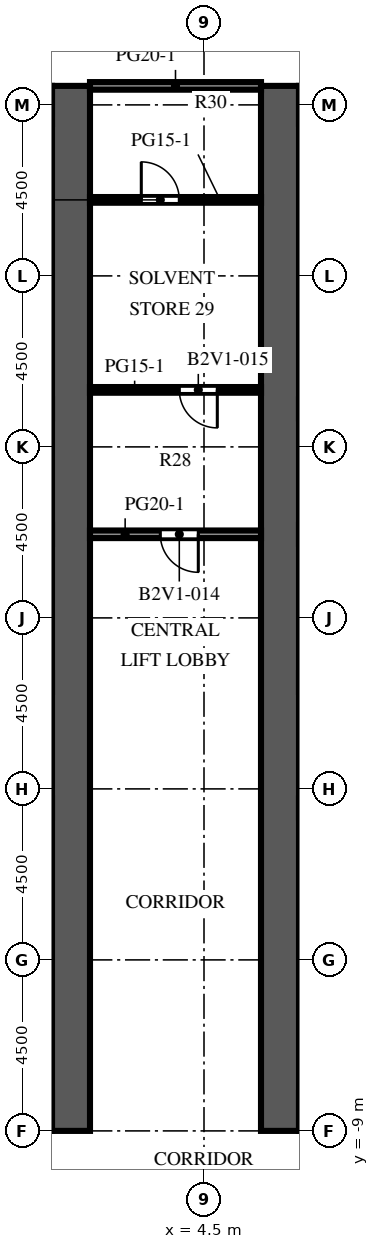
"""IFC4 building model, lengths in metres.
Left out: names, types, materials, properties, quantities, classifications, styles, units other than length and angle.
Written with IfcOpenShell. Run it as: python <this file> out.ifc"""

import sys

from ifc_helpers import new_model, si_unit, direction, frame, frame_2d, origin, place, context, subcontext, project, spatial, rectangle, extrude, element, fill, save


model = new_model("IFC4")
c1 = context("Model", 3, precision=1e-05, world=origin(), true_north=direction((0.0, 1.0)))
c2 = subcontext(c1, "Body", "Model", "MODEL_VIEW")
j1 = project(units=[si_unit("LENGTHUNIT", "METRE"), si_unit("PLANEANGLEUNIT", "RADIAN")], contexts=[c1])
p1 = place(None, origin())
s1 = spatial("IfcSite", under=j1, at=p1, CompositionType="ELEMENT")
p2 = place(p1, origin())
s2 = spatial("IfcBuilding", under=s1, at=p2, CompositionType="ELEMENT")
p3 = place(p2, frame((0.0, 0.0, 54.2)))
s3 = spatial("IfcBuildingStorey", under=s2, at=p3, CompositionType="ELEMENT", Elevation=54.2)
p4 = place(p3, frame((1.0, -9.0, 0.0), z_axis=(0.0, 0.0, 1.0), x_axis=(0.0, 1.0, 0.0)))
e1 = element("IfcWall", 1, at=p4, inside=s3, PredefinedType="SHEAR", context=c2, shape_type="SweptSolid", body=[
    extrude(rectangle(XDim=27.5, YDim=1.0, at=frame_2d((13.75, 0.0))), origin(), (0.0, 0.0, 1.0), 4.1),
])
p5 = place(p4, frame((12.55, 0.0, 0.0)))
e2 = element("IfcOpeningElement", 2, at=p5, cuts=e1, PredefinedType="OPENING", context=c2, shape_type="SweptSolid", body=[
    extrude(rectangle(XDim=2.4, YDim=2.4, at=frame_2d((1.2, 1.2))), frame((0.0, 0.51, 0.0), z_axis=(0.0, -1.0, 0.0), x_axis=(1.0, 0.0, 0.0)), (0.0, 0.0, 1.0), 1.02),
])
p6 = place(p4, frame((4.025, 0.0, 0.0)))
e3 = element("IfcOpeningElement", 3, at=p6, cuts=e1, PredefinedType="OPENING", context=c2, shape_type="SweptSolid", body=[
    extrude(rectangle(XDim=1.2, YDim=2.1, at=frame_2d((0.6, 1.05))), frame((0.0, 0.51, 0.0), z_axis=(0.0, -1.0, 0.0), x_axis=(1.0, 0.0, 0.0)), (0.0, 0.0, 1.0), 1.02),
])
p7 = place(p4, frame((22.275, 0.0, 0.0)))
e4 = element("IfcOpeningElement", 4, at=p7, cuts=e1, PredefinedType="OPENING", context=c2, shape_type="SweptSolid", body=[
    extrude(rectangle(XDim=1.2, YDim=2.1, at=frame_2d((0.6, 1.05))), frame((0.0, 0.51, 0.0), z_axis=(0.0, -1.0, 0.0), x_axis=(1.0, 0.0, 0.0)), (0.0, 0.0, 1.0), 1.02),
])
p8 = place(p3, frame((6.5, -9.0, 0.0), z_axis=(0.0, 0.0, 1.0), x_axis=(0.0, 1.0, 0.0)))
e5 = element("IfcWall", 5, at=p8, inside=s3, PredefinedType="SHEAR", context=c2, shape_type="SweptSolid", body=[
    extrude(rectangle(XDim=27.5, YDim=1.0, at=frame_2d((13.75, 0.0))), origin(), (0.0, 0.0, 1.0), 4.1),
])
p9 = place(p8, frame((12.55, 0.0, 0.0)))
e6 = element("IfcOpeningElement", 6, at=p9, cuts=e5, PredefinedType="OPENING", context=c2, shape_type="SweptSolid", body=[
    extrude(rectangle(XDim=2.4, YDim=2.4, at=frame_2d((1.2, 1.2))), frame((0.0, 0.51, 0.0), z_axis=(0.0, -1.0, 0.0), x_axis=(1.0, 0.0, 0.0)), (0.0, 0.0, 1.0), 1.02),
])
p10 = place(p8, frame((4.025, 0.0, 0.0)))
e7 = element("IfcOpeningElement", 7, at=p10, cuts=e5, PredefinedType="OPENING", context=c2, shape_type="SweptSolid", body=[
    extrude(rectangle(XDim=1.2, YDim=2.1, at=frame_2d((0.6, 1.05))), frame((0.0, 0.51, 0.0), z_axis=(0.0, -1.0, 0.0), x_axis=(1.0, 0.0, 0.0)), (0.0, 0.0, 1.0), 1.02),
])
p11 = place(p8, frame((22.275, 0.0, 0.0)))
e8 = element("IfcOpeningElement", 8, at=p11, cuts=e5, PredefinedType="OPENING", context=c2, shape_type="SweptSolid", body=[
    extrude(rectangle(XDim=1.2, YDim=2.1, at=frame_2d((0.6, 1.05))), frame((0.0, 0.51, 0.0), z_axis=(0.0, -1.0, 0.0), x_axis=(1.0, 0.0, 0.0)), (0.0, 0.0, 1.0), 1.02),
])
p12 = place(p3, frame((1.5, 6.7, 0.0), z_axis=(0.0, 0.0, 1.0), x_axis=(1.0, 0.0, 0.0)))
e9 = element("IfcWall", 9, at=p12, inside=s3, PredefinedType="PARTITIONING", context=c2, shape_type="SweptSolid", body=[
    extrude(rectangle(XDim=4.5, YDim=0.2, at=frame_2d((2.25, 0.0))), origin(), (0.0, 0.0, 1.0), 3.65),
])
p13 = place(p12, frame((1.85, 0.0, 0.0)))
e10 = element("IfcOpeningElement", 10, at=p13, cuts=e9, PredefinedType="OPENING", context=c2, shape_type="SweptSolid", body=[
    extrude(rectangle(XDim=1.0, YDim=2.1, at=frame_2d((0.5, 1.05))), frame((0.0, 0.11, 0.0), z_axis=(0.0, -1.0, 0.0), x_axis=(1.0, 0.0, 0.0)), (0.0, 0.0, 1.0), 0.22),
])
p14 = place(p3, frame((1.5, 10.5, 0.0), z_axis=(0.0, 0.0, 1.0), x_axis=(1.0, 0.0, 0.0)))
e11 = element("IfcWall", 11, at=p14, inside=s3, PredefinedType="PARTITIONING", context=c2, shape_type="SweptSolid", body=[
    extrude(rectangle(XDim=4.5, YDim=0.15, at=frame_2d((2.25, 0.0))), origin(), (0.0, 0.0, 1.0), 3.65),
])
p15 = place(p14, frame((2.35, 0.0, 0.0)))
e12 = element("IfcOpeningElement", 12, at=p15, cuts=e11, PredefinedType="OPENING", context=c2, shape_type="SweptSolid", body=[
    extrude(rectangle(XDim=1.0, YDim=2.1, at=frame_2d((0.5, 1.05))), frame((0.0, 0.085, 0.0), z_axis=(0.0, -1.0, 0.0), x_axis=(1.0, 0.0, 0.0)), (0.0, 0.0, 1.0), 0.17),
])
p16 = place(p3, frame((1.5, 15.5, 0.0), z_axis=(0.0, 0.0, 1.0), x_axis=(1.0, 0.0, 0.0)))
e13 = element("IfcWall", 13, at=p16, inside=s3, PredefinedType="PARTITIONING", context=c2, shape_type="SweptSolid", body=[
    extrude(rectangle(XDim=4.5, YDim=0.15, at=frame_2d((2.25, 0.0))), origin(), (0.0, 0.0, 1.0), 3.65),
])
p17 = place(p16, frame((1.35, 0.0, 0.0)))
e14 = element("IfcOpeningElement", 14, at=p17, cuts=e13, PredefinedType="OPENING", context=c2, shape_type="SweptSolid", body=[
    extrude(rectangle(XDim=1.0, YDim=2.1, at=frame_2d((0.5, 1.05))), frame((0.0, 0.085, 0.0), z_axis=(0.0, -1.0, 0.0), x_axis=(1.0, 0.0, 0.0)), (0.0, 0.0, 1.0), 0.17),
])
p18 = place(p3, frame((1.5, 18.5, 0.0), z_axis=(0.0, 0.0, 1.0), x_axis=(1.0, 0.0, 0.0)))
e15 = element("IfcWall", 15, at=p18, inside=s3, PredefinedType="PARTITIONING", context=c2, shape_type="SweptSolid", body=[
    extrude(rectangle(XDim=4.5, YDim=0.2, at=frame_2d((2.25, 0.0))), origin(), (0.0, 0.0, 1.0), 3.65),
])
p19 = place(p5, origin())
e16 = element("IfcDoor", 16, at=p19, inside=s3, OperationType="DOUBLE_DOOR_DOUBLE_SWING", PredefinedType="DOOR", context=c2, shape_type="SweptSolid", body=[
    extrude(rectangle(XDim=2.4, YDim=2.4, at=frame_2d((1.2, 1.2))), frame((0.0, 0.025, 0.0), z_axis=(0.0, -1.0, 0.0), x_axis=(1.0, 0.0, 0.0)), (0.0, 0.0, 1.0), 0.05),
])
fill(e2, e16)
p20 = place(p9, origin())
e17 = element("IfcDoor", 17, at=p20, inside=s3, OperationType="DOUBLE_DOOR_DOUBLE_SWING", PredefinedType="DOOR", context=c2, shape_type="SweptSolid", body=[
    extrude(rectangle(XDim=2.4, YDim=2.4, at=frame_2d((1.2, 1.2))), frame((0.0, 0.025, 0.0), z_axis=(0.0, -1.0, 0.0), x_axis=(1.0, 0.0, 0.0)), (0.0, 0.0, 1.0), 0.05),
])
fill(e6, e17)
p21 = place(p6, origin())
e18 = element("IfcDoor", 18, at=p21, inside=s3, OperationType="SINGLE_SWING_LEFT", PredefinedType="DOOR", context=c2, shape_type="SweptSolid", body=[
    extrude(rectangle(XDim=1.2, YDim=2.1, at=frame_2d((0.6, 1.05))), frame((0.0, 0.475, 0.0), z_axis=(0.0, -1.0, 0.0), x_axis=(1.0, 0.0, 0.0)), (0.0, 0.0, 1.0), 0.05),
])
fill(e3, e18)
p22 = place(p7, origin())
e19 = element("IfcDoor", 19, at=p22, inside=s3, OperationType="SINGLE_SWING_LEFT", PredefinedType="DOOR", context=c2, shape_type="SweptSolid", body=[
    extrude(rectangle(XDim=1.2, YDim=2.1, at=frame_2d((0.6, 1.05))), frame((0.0, 0.475, 0.0), z_axis=(0.0, -1.0, 0.0), x_axis=(1.0, 0.0, 0.0)), (0.0, 0.0, 1.0), 0.05),
])
fill(e4, e19)
p23 = place(p10, origin())
e20 = element("IfcDoor", 20, at=p23, inside=s3, OperationType="SINGLE_SWING_RIGHT", PredefinedType="DOOR", context=c2, shape_type="SweptSolid", body=[
    extrude(rectangle(XDim=1.2, YDim=2.1, at=frame_2d((0.6, 1.05))), frame((0.0, -0.425, 0.0), z_axis=(0.0, -1.0, 0.0), x_axis=(1.0, 0.0, 0.0)), (0.0, 0.0, 1.0), 0.05),
])
fill(e7, e20)
p24 = place(p11, origin())
e21 = element("IfcDoor", 21, at=p24, inside=s3, OperationType="SINGLE_SWING_RIGHT", PredefinedType="DOOR", context=c2, shape_type="SweptSolid", body=[
    extrude(rectangle(XDim=1.2, YDim=2.1, at=frame_2d((0.6, 1.05))), frame((0.0, -0.425, 0.0), z_axis=(0.0, -1.0, 0.0), x_axis=(1.0, 0.0, 0.0)), (0.0, 0.0, 1.0), 0.05),
])
fill(e8, e21)
p25 = place(p13, origin())
e22 = element("IfcDoor", 22, at=p25, inside=s3, OperationType="SINGLE_SWING_RIGHT", PredefinedType="DOOR", context=c2, shape_type="SweptSolid", body=[
    extrude(rectangle(XDim=1.0, YDim=2.1, at=frame_2d((0.5, 1.05))), frame((0.0, 0.025, 0.0), z_axis=(0.0, -1.0, 0.0), x_axis=(1.0, 0.0, 0.0)), (0.0, 0.0, 1.0), 0.05),
])
fill(e10, e22)
p26 = place(p15, origin())
e23 = element("IfcDoor", 23, at=p26, inside=s3, OperationType="SINGLE_SWING_RIGHT", PredefinedType="DOOR", context=c2, shape_type="SweptSolid", body=[
    extrude(rectangle(XDim=1.0, YDim=2.1, at=frame_2d((0.5, 1.05))), frame((0.0, 0.025, 0.0), z_axis=(0.0, -1.0, 0.0), x_axis=(1.0, 0.0, 0.0)), (0.0, 0.0, 1.0), 0.05),
])
fill(e12, e23)
p27 = place(p17, origin())
e24 = element("IfcDoor", 24, at=p27, inside=s3, OperationType="SINGLE_SWING_LEFT", PredefinedType="DOOR", context=c2, shape_type="SweptSolid", body=[
    extrude(rectangle(XDim=1.0, YDim=2.1, at=frame_2d((0.5, 1.05))), frame((0.0, 0.025, 0.0), z_axis=(0.0, -1.0, 0.0), x_axis=(1.0, 0.0, 0.0)), (0.0, 0.0, 1.0), 0.05),
])
fill(e14, e24)
save(model, sys.argv[1])
